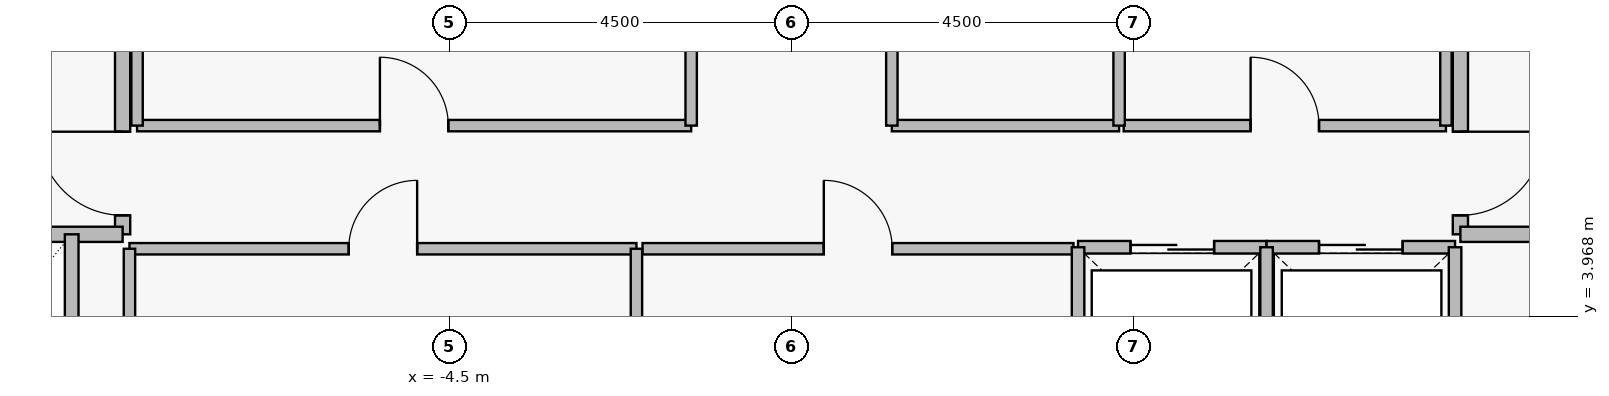
"""IFC4 building model, lengths in metres.
Left out: names, types, materials, properties, quantities, classifications, styles, units other than length and angle.
Written with IfcOpenShell. Run it as: python <this file> out.ifc"""

import sys

from ifc_helpers import new_model, si_unit, direction, frame, frame_2d, origin, place, context, subcontext, project, spatial, rectangle, extrude, element, fill, save


model = new_model("IFC4")
c1 = context("Model", 3, precision=1e-05, world=origin(), true_north=direction((0.0, 1.0)))
c2 = subcontext(c1, "Body", "Model", "MODEL_VIEW")
j1 = project(units=[si_unit("LENGTHUNIT", "METRE"), si_unit("PLANEANGLEUNIT", "RADIAN")], contexts=[c1])
p1 = place(None, origin())
s1 = spatial("IfcSite", under=j1, at=p1, CompositionType="ELEMENT")
p2 = place(p1, origin())
s2 = spatial("IfcBuilding", under=s1, at=p2, CompositionType="ELEMENT")
p3 = place(p2, frame((0.0, 0.0, 261.85)))
s3 = spatial("IfcBuildingStorey", under=s2, at=p3, CompositionType="ELEMENT", Elevation=261.85)
p4 = place(p3, frame((-8.8, 5.05, 0.0), z_axis=(0.0, 0.0, 1.0), x_axis=(0.0, 1.0, 0.0)))
e1 = element("IfcWall", 1, at=p4, inside=s3, PredefinedType="PARTITIONING", context=c2, shape_type="SweptSolid", body=[
    extrude(rectangle(XDim=6.1, YDim=0.2, at=frame_2d((3.05, 0.0))), origin(), (0.0, 0.0, 1.0), 3.48),
])
p5 = place(p4, frame((0.25, 0.0, 0.0)))
e2 = element("IfcOpeningElement", 2, at=p5, cuts=e1, PredefinedType="OPENING", context=c2, shape_type="SweptSolid", body=[
    extrude(rectangle(XDim=1.1, YDim=2.2, at=frame_2d((0.55, 1.1))), frame((0.0, 0.11, 0.0), z_axis=(0.0, -1.0, 0.0), x_axis=(1.0, 0.0, 0.0)), (0.0, 0.0, 1.0), 0.22),
])
p6 = place(p4, frame((3.85, 0.0, 0.0)))
e3 = element("IfcOpeningElement", 3, at=p6, cuts=e1, PredefinedType="OPENING", context=c2, shape_type="SweptSolid", body=[
    extrude(rectangle(XDim=1.1, YDim=2.2, at=frame_2d((0.55, 1.1))), frame((0.0, 0.11, 0.0), z_axis=(0.0, -1.0, 0.0), x_axis=(1.0, 0.0, 0.0)), (0.0, 0.0, 1.0), 0.22),
])
p7 = place(p3, frame((8.8, 11.15, 0.0), z_axis=(0.0, 0.0, 1.0), x_axis=(0.0, -1.0, 0.0)))
e4 = element("IfcWall", 4, at=p7, inside=s3, PredefinedType="PARTITIONING", context=c2, shape_type="SweptSolid", body=[
    extrude(rectangle(XDim=6.1, YDim=0.2, at=frame_2d((3.05, 0.0))), origin(), (0.0, 0.0, 1.0), 3.48),
])
p8 = place(p7, frame((1.15, 0.0, 0.0)))
e5 = element("IfcOpeningElement", 5, at=p8, cuts=e4, PredefinedType="OPENING", context=c2, shape_type="SweptSolid", body=[
    extrude(rectangle(XDim=1.1, YDim=2.2, at=frame_2d((0.55, 1.1))), frame((0.0, 0.11, 0.0), z_axis=(0.0, -1.0, 0.0), x_axis=(1.0, 0.0, 0.0)), (0.0, 0.0, 1.0), 0.22),
])
p9 = place(p7, frame((4.75, 0.0, 0.0)))
e6 = element("IfcOpeningElement", 6, at=p9, cuts=e4, PredefinedType="OPENING", context=c2, shape_type="SweptSolid", body=[
    extrude(rectangle(XDim=1.1, YDim=2.2, at=frame_2d((0.55, 1.1))), frame((0.0, 0.11, 0.0), z_axis=(0.0, -1.0, 0.0), x_axis=(1.0, 0.0, 0.0)), (0.0, 0.0, 1.0), 0.22),
])
p10 = place(p3, frame((3.77, 4.88, 0.0), z_axis=(0.0, 0.0, 1.0), x_axis=(1.0, 0.0, 0.0)))
e7 = element("IfcWall", 7, at=p10, inside=s3, PredefinedType="PARTITIONING", context=c2, shape_type="SweptSolid", body=[
    extrude(rectangle(XDim=2.48, YDim=0.165, at=frame_2d((1.24, 0.0))), origin(), (0.0, 0.0, 1.0), 3.48),
])
p11 = place(p10, frame((0.69, 0.0, 0.0)))
e8 = element("IfcOpeningElement", 8, at=p11, cuts=e7, PredefinedType="OPENING", context=c2, shape_type="SweptSolid", body=[
    extrude(rectangle(XDim=1.1, YDim=2.25, at=frame_2d((0.55, 1.125))), frame((0.0, 0.093, 0.0), z_axis=(0.0, -1.0, 0.0), x_axis=(1.0, 0.0, 0.0)), (0.0, 0.0, 1.0), 0.185),
])
p12 = place(p3, frame((6.25, 4.88, 0.0), z_axis=(0.0, 0.0, 1.0), x_axis=(1.0, 0.0, 0.0)))
e9 = element("IfcWall", 9, at=p12, inside=s3, PredefinedType="PARTITIONING", context=c2, shape_type="SweptSolid", body=[
    extrude(rectangle(XDim=2.48, YDim=0.165, at=frame_2d((1.24, 0.0))), origin(), (0.0, 0.0, 1.0), 3.48),
])
p13 = place(p12, frame((0.69, 0.0, 0.0)))
e10 = element("IfcOpeningElement", 10, at=p13, cuts=e9, PredefinedType="OPENING", context=c2, shape_type="SweptSolid", body=[
    extrude(rectangle(XDim=1.1, YDim=2.25, at=frame_2d((0.55, 1.125))), frame((0.0, 0.093, 0.0), z_axis=(0.0, -1.0, 0.0), x_axis=(1.0, 0.0, 0.0)), (0.0, 0.0, 1.0), 0.185),
])
p14 = place(p3, frame((-8.71, 4.86, 0.0), z_axis=(0.0, 0.0, 1.0), x_axis=(1.0, 0.0, 0.0)))
e11 = element("IfcWall", 11, at=p14, inside=s3, PredefinedType="PARTITIONING", context=c2, shape_type="SweptSolid", body=[
    extrude(rectangle(XDim=6.67, YDim=0.15, at=frame_2d((3.335, 0.0))), origin(), (0.0, 0.0, 1.0), 3.48),
])
p15 = place(p14, frame((2.885, 0.0, 0.0)))
e12 = element("IfcOpeningElement", 12, at=p15, cuts=e11, PredefinedType="OPENING", context=c2, shape_type="SweptSolid", body=[
    extrude(rectangle(XDim=0.9, YDim=2.15, at=frame_2d((0.45, 1.075))), frame((0.0, 0.085, 0.0), z_axis=(0.0, -1.0, 0.0), x_axis=(1.0, 0.0, 0.0)), (0.0, 0.0, 1.0), 0.17),
])
p16 = place(p3, frame((-1.96, 4.86, 0.0), z_axis=(0.0, 0.0, 1.0), x_axis=(1.0, 0.0, 0.0)))
e13 = element("IfcWall", 13, at=p16, inside=s3, PredefinedType="PARTITIONING", context=c2, shape_type="SweptSolid", body=[
    extrude(rectangle(XDim=5.67, YDim=0.15, at=frame_2d((2.835, 0.0))), origin(), (0.0, 0.0, 1.0), 3.48),
])
p17 = place(p16, frame((2.385, 0.0, 0.0)))
e14 = element("IfcOpeningElement", 14, at=p17, cuts=e13, PredefinedType="OPENING", context=c2, shape_type="SweptSolid", body=[
    extrude(rectangle(XDim=0.9, YDim=2.15, at=frame_2d((0.45, 1.075))), frame((0.0, 0.085, 0.0), z_axis=(0.0, -1.0, 0.0), x_axis=(1.0, 0.0, 0.0)), (0.0, 0.0, 1.0), 0.17),
])
p18 = place(p3, frame((-8.61, 6.48, 0.0), z_axis=(0.0, 0.0, 1.0), x_axis=(1.0, 0.0, 0.0)))
e15 = element("IfcWall", 15, at=p18, inside=s3, PredefinedType="PARTITIONING", context=c2, shape_type="SweptSolid", body=[
    extrude(rectangle(XDim=7.29, YDim=0.15, at=frame_2d((3.645, 0.0))), origin(), (0.0, 0.0, 1.0), 3.48),
])
p19 = place(p18, frame((3.195, 0.0, 0.0)))
e16 = element("IfcOpeningElement", 16, at=p19, cuts=e15, PredefinedType="OPENING", context=c2, shape_type="SweptSolid", body=[
    extrude(rectangle(XDim=0.9, YDim=2.15, at=frame_2d((0.45, 1.075))), frame((0.0, 0.085, 0.0), z_axis=(0.0, -1.0, 0.0), x_axis=(1.0, 0.0, 0.0)), (0.0, 0.0, 1.0), 0.17),
])
p20 = place(p3, frame((4.37, 6.48, 0.0), z_axis=(0.0, 0.0, 1.0), x_axis=(1.0, 0.0, 0.0)))
e17 = element("IfcWall", 17, at=p20, inside=s3, PredefinedType="PARTITIONING", context=c2, shape_type="SweptSolid", body=[
    extrude(rectangle(XDim=4.24, YDim=0.15, at=frame_2d((2.12, 0.0))), origin(), (0.0, 0.0, 1.0), 3.48),
])
p21 = place(p20, frame((1.67, 0.0, 0.0)))
e18 = element("IfcOpeningElement", 18, at=p21, cuts=e17, PredefinedType="OPENING", context=c2, shape_type="SweptSolid", body=[
    extrude(rectangle(XDim=0.9, YDim=2.15, at=frame_2d((0.45, 1.075))), frame((0.0, 0.085, 0.0), z_axis=(0.0, -1.0, 0.0), x_axis=(1.0, 0.0, 0.0)), (0.0, 0.0, 1.0), 0.17),
])
for number, where, z_axis, x_axis in (
    (19, (-11.65, 5.05, 0.0), (0.0, 0.0, 1.0), (1.0, 0.0, 0.0)),
    (20, (8.8, 5.05, 0.0), (0.0, 0.0, 1.0), (1.0, 0.0, 0.0)),
):
    element("IfcWall", number, at=place(p3, frame(where, z_axis=z_axis, x_axis=x_axis)), inside=s3, PredefinedType="PARTITIONING", context=c2, shape_type="SweptSolid", body=[
        extrude(rectangle(XDim=2.85, YDim=0.2, at=frame_2d((1.425, 0.0))), origin(), (0.0, 0.0, 1.0), 3.48),
    ])
for number, where, z_axis, x_axis in (
    (21, (3.77, 2.52, 0.0), (0.0, 0.0, 1.0), (0.0, 1.0, 0.0)),
    (22, (6.25, 2.52, 0.0), (0.0, 0.0, 1.0), (0.0, 1.0, 0.0)),
    (23, (8.73, 2.52, 0.0), (0.0, 0.0, 1.0), (0.0, 1.0, 0.0)),
):
    element("IfcWall", number, at=place(p3, frame(where, z_axis=z_axis, x_axis=x_axis)), inside=s3, PredefinedType="PARTITIONING", context=c2, shape_type="SweptSolid", body=[
        extrude(rectangle(XDim=2.36, YDim=0.165, at=frame_2d((1.18, 0.0))), origin(), (0.0, 0.0, 1.0), 3.48),
    ])
for number, where, z_axis, x_axis in (
    (24, (-8.71, 2.49, 0.0), (0.0, 0.0, 1.0), (0.0, 1.0, 0.0)),
    (25, (-2.04, 2.49, 0.0), (0.0, 0.0, 1.0), (0.0, 1.0, 0.0)),
):
    element("IfcWall", number, at=place(p3, frame(where, z_axis=z_axis, x_axis=x_axis)), inside=s3, PredefinedType="PARTITIONING", context=c2, shape_type="SweptSolid", body=[
        extrude(rectangle(XDim=2.37, YDim=0.15, at=frame_2d((1.185, 0.0))), origin(), (0.0, 0.0, 1.0), 3.48),
    ])
p22 = place(p3, frame((-9.47, 2.45, 0.0), z_axis=(0.0, 0.0, 1.0), x_axis=(0.0, 1.0, 0.0)))
e26 = element("IfcWall", 26, at=p22, inside=s3, PredefinedType="PARTITIONING", context=c2, shape_type="SweptSolid", body=[
    extrude(rectangle(XDim=2.6, YDim=0.18, at=frame_2d((1.3, 0.0))), origin(), (0.0, 0.0, 1.0), 3.48),
])
for number, where, z_axis, x_axis in (
    (27, (-8.61, 6.48, 0.0), (0.0, 0.0, 1.0), (0.0, 1.0, 0.0)),
    (28, (-1.32, 6.48, 0.0), (0.0, 0.0, 1.0), (0.0, 1.0, 0.0)),
):
    element("IfcWall", number, at=place(p3, frame(where, z_axis=z_axis, x_axis=x_axis)), inside=s3, PredefinedType="PARTITIONING", context=c2, shape_type="SweptSolid", body=[
        extrude(rectangle(XDim=2.24, YDim=0.15, at=frame_2d((1.12, 0.0))), origin(), (0.0, 0.0, 1.0), 3.48),
    ])
p23 = place(p3, frame((1.32, 6.48, 0.0), z_axis=(0.0, 0.0, 1.0), x_axis=(1.0, 0.0, 0.0)))
e29 = element("IfcWall", 29, at=p23, inside=s3, PredefinedType="PARTITIONING", context=c2, shape_type="SweptSolid", body=[
    extrude(rectangle(XDim=2.99, YDim=0.15, at=frame_2d((1.495, 0.0))), origin(), (0.0, 0.0, 1.0), 3.48),
])
for number, where, z_axis, x_axis in (
    (30, (1.32, 6.48, 0.0), (0.0, 0.0, 1.0), (0.0, 1.0, 0.0)),
    (31, (4.31, 6.48, 0.0), (0.0, 0.0, 1.0), (0.0, 1.0, 0.0)),
    (32, (8.61, 6.48, 0.0), (0.0, 0.0, 1.0), (0.0, 1.0, 0.0)),
):
    element("IfcWall", number, at=place(p3, frame(where, z_axis=z_axis, x_axis=x_axis)), inside=s3, PredefinedType="PARTITIONING", context=c2, shape_type="SweptSolid", body=[
        extrude(rectangle(XDim=2.24, YDim=0.15, at=frame_2d((1.12, 0.0))), origin(), (0.0, 0.0, 1.0), 3.48),
    ])
p24 = place(p5, origin())
e33 = element("IfcDoor", 33, at=p24, inside=s3, OperationType="SINGLE_SWING_RIGHT", PredefinedType="DOOR", context=c2, shape_type="SweptSolid", body=[
    extrude(rectangle(XDim=1.1, YDim=2.2, at=frame_2d((0.55, 1.1))), frame((0.0, 0.025, 0.0), z_axis=(0.0, -1.0, 0.0), x_axis=(1.0, 0.0, 0.0)), (0.0, 0.0, 1.0), 0.05),
])
fill(e2, e33)
p25 = place(p9, origin())
e34 = element("IfcDoor", 34, at=p25, inside=s3, OperationType="SINGLE_SWING_LEFT", PredefinedType="DOOR", context=c2, shape_type="SweptSolid", body=[
    extrude(rectangle(XDim=1.1, YDim=2.2, at=frame_2d((0.55, 1.1))), frame((0.0, 0.025, 0.0), z_axis=(0.0, -1.0, 0.0), x_axis=(1.0, 0.0, 0.0)), (0.0, 0.0, 1.0), 0.05),
])
fill(e6, e34)
p26 = place(p11, origin())
e35 = element("IfcDoor", 35, at=p26, inside=s3, OperationType="SLIDING_TO_LEFT", PredefinedType="DOOR", context=c2, shape_type="SweptSolid", body=[
    extrude(rectangle(XDim=1.1, YDim=2.25, at=frame_2d((0.55, 1.125))), frame((0.0, 0.025, 0.0), z_axis=(0.0, -1.0, 0.0), x_axis=(1.0, 0.0, 0.0)), (0.0, 0.0, 1.0), 0.05),
])
fill(e8, e35)
p27 = place(p13, origin())
e36 = element("IfcDoor", 36, at=p27, inside=s3, OperationType="SLIDING_TO_LEFT", PredefinedType="DOOR", context=c2, shape_type="SweptSolid", body=[
    extrude(rectangle(XDim=1.1, YDim=2.25, at=frame_2d((0.55, 1.125))), frame((0.0, 0.025, 0.0), z_axis=(0.0, -1.0, 0.0), x_axis=(1.0, 0.0, 0.0)), (0.0, 0.0, 1.0), 0.05),
])
fill(e10, e36)
p28 = place(p15, origin())
e37 = element("IfcDoor", 37, at=p28, inside=s3, OperationType="SINGLE_SWING_RIGHT", PredefinedType="DOOR", context=c2, shape_type="SweptSolid", body=[
    extrude(rectangle(XDim=0.9, YDim=2.15, at=frame_2d((0.45, 1.075))), frame((0.0, 0.025, 0.0), z_axis=(0.0, -1.0, 0.0), x_axis=(1.0, 0.0, 0.0)), (0.0, 0.0, 1.0), 0.05),
])
fill(e12, e37)
p29 = place(p17, origin())
e38 = element("IfcDoor", 38, at=p29, inside=s3, OperationType="SINGLE_SWING_LEFT", PredefinedType="DOOR", context=c2, shape_type="SweptSolid", body=[
    extrude(rectangle(XDim=0.9, YDim=2.15, at=frame_2d((0.45, 1.075))), frame((0.0, 0.025, 0.0), z_axis=(0.0, -1.0, 0.0), x_axis=(1.0, 0.0, 0.0)), (0.0, 0.0, 1.0), 0.05),
])
fill(e14, e38)
p30 = place(p19, origin())
e39 = element("IfcDoor", 39, at=p30, inside=s3, OperationType="SINGLE_SWING_LEFT", PredefinedType="DOOR", context=c2, shape_type="SweptSolid", body=[
    extrude(rectangle(XDim=0.9, YDim=2.15, at=frame_2d((0.45, 1.075))), frame((0.0, 0.025, 0.0), z_axis=(0.0, -1.0, 0.0), x_axis=(1.0, 0.0, 0.0)), (0.0, 0.0, 1.0), 0.05),
])
fill(e16, e39)
p31 = place(p21, origin())
e40 = element("IfcDoor", 40, at=p31, inside=s3, OperationType="SINGLE_SWING_LEFT", PredefinedType="DOOR", context=c2, shape_type="SweptSolid", body=[
    extrude(rectangle(XDim=0.9, YDim=2.15, at=frame_2d((0.45, 1.075))), frame((0.0, 0.025, 0.0), z_axis=(0.0, -1.0, 0.0), x_axis=(1.0, 0.0, 0.0)), (0.0, 0.0, 1.0), 0.05),
])
fill(e18, e40)
save(model, sys.argv[1])
